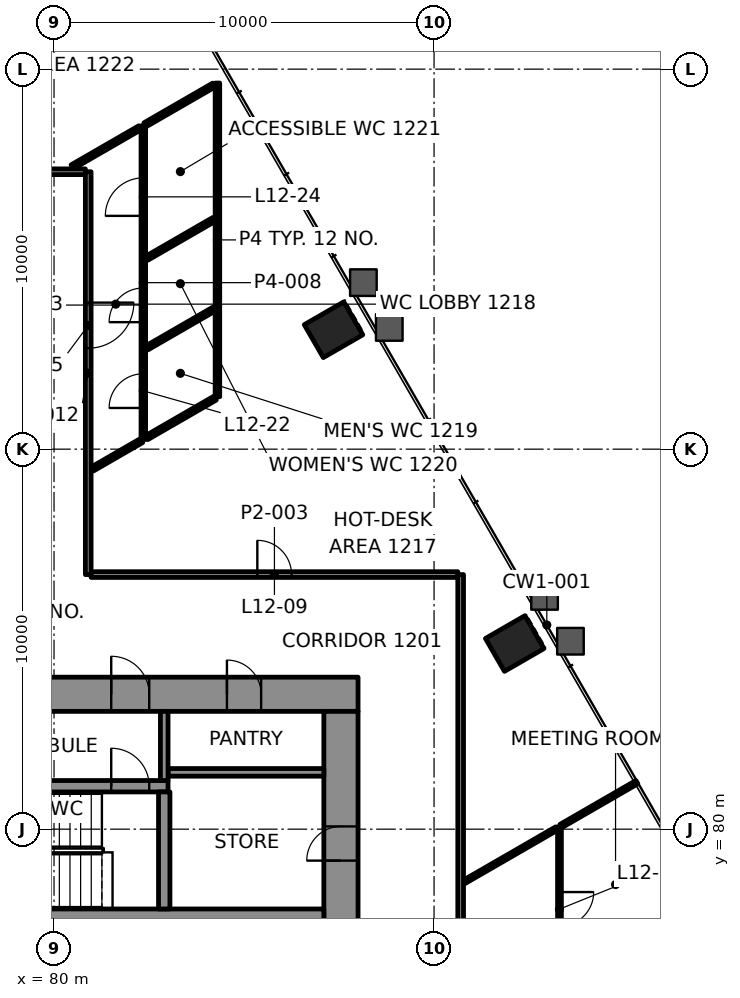
"""IFC4 building model, lengths in metres.
Left out: names, types, materials, properties, quantities, classifications, styles, units other than length and angle.
Written with IfcOpenShell. Run it as: python <this file> out.ifc"""

import sys

from ifc_helpers import new_model, si_unit, direction, frame, frame_2d, origin, origin_2d, place, context, subcontext, project, spatial, rectangle, extrude, element, fill, save


model = new_model("IFC4")
c1 = context("Model", 3, precision=1e-05, world=origin(), true_north=direction((0.0, 1.0)))
c2 = subcontext(c1, "Body", "Model", "MODEL_VIEW")
j1 = project(units=[si_unit("LENGTHUNIT", "METRE"), si_unit("PLANEANGLEUNIT", "RADIAN")], contexts=[c1])
p1 = place(None, origin())
s1 = spatial("IfcSite", under=j1, at=p1, CompositionType="ELEMENT")
p2 = place(p1, origin())
s2 = spatial("IfcBuilding", under=s1, at=p2, CompositionType="ELEMENT")
p3 = place(p2, frame((0.0, 0.0, 56.8)))
s3 = spatial("IfcBuildingStorey", under=s2, at=p3, CompositionType="ELEMENT", Elevation=56.8)
for number, where, z_axis, x_axis in (
    (1, (92.122, 84.885, -0.0), (0.0, 0.0, 1.0), (-0.5, 0.866, 0.0)),
    (2, (87.355, 93.143, -0.0), (0.0, 0.0, 1.0), (-0.5, 0.866, 0.0)),
):
    element("IfcColumn", number, at=place(p3, frame(where, z_axis=z_axis, x_axis=x_axis)), inside=s3, PredefinedType="COLUMN", context=c2, shape_type="SweptSolid", body=[
        extrude(rectangle(XDim=1.0, YDim=1.2, at=origin_2d()), origin(), (0.0, 0.0, 1.0), 4.2),
    ])
p4 = place(p3, frame((62.0, 83.55, 0.0), z_axis=(0.0, 0.0, 1.0), x_axis=(1.0, 0.0, 0.0)))
e3 = element("IfcWall", 3, at=p4, inside=s3, PredefinedType="SHEAR", context=c2, shape_type="SweptSolid", body=[
    extrude(rectangle(XDim=26.0, YDim=0.9, at=frame_2d((13.0, 0.0))), origin(), (0.0, 0.0, 1.0), 4.0),
])
p5 = place(p4, frame((5.695, 0.0, 0.0)))
e4 = element("IfcOpeningElement", 4, at=p5, cuts=e3, PredefinedType="OPENING", context=c2, shape_type="SweptSolid", body=[
    extrude(rectangle(XDim=1.0, YDim=2.1, at=frame_2d((0.5, 1.05))), frame((0.0, 0.46, 0.0), z_axis=(0.0, -1.0, 0.0), x_axis=(1.0, 0.0, 0.0)), (0.0, 0.0, 1.0), 0.92),
])
p6 = place(p4, frame((19.505, 0.0, 0.0)))
e5 = element("IfcOpeningElement", 5, at=p6, cuts=e3, PredefinedType="OPENING", context=c2, shape_type="SweptSolid", body=[
    extrude(rectangle(XDim=1.0, YDim=2.1, at=frame_2d((0.5, 1.05))), frame((0.0, 0.46, 0.0), z_axis=(0.0, -1.0, 0.0), x_axis=(1.0, 0.0, 0.0)), (0.0, 0.0, 1.0), 0.92),
])
p7 = place(p4, frame((3.45, 0.0, 0.0)))
e6 = element("IfcOpeningElement", 6, at=p7, cuts=e3, PredefinedType="OPENING", context=c2, shape_type="SweptSolid", body=[
    extrude(rectangle(XDim=0.9, YDim=2.1, at=frame_2d((0.45, 1.05))), frame((0.0, 0.46, 0.0), z_axis=(0.0, -1.0, 0.0), x_axis=(1.0, 0.0, 0.0)), (0.0, 0.0, 1.0), 0.92),
])
p8 = place(p4, frame((12.65, 0.0, 0.0)))
e7 = element("IfcOpeningElement", 7, at=p8, cuts=e3, PredefinedType="OPENING", context=c2, shape_type="SweptSolid", body=[
    extrude(rectangle(XDim=0.9, YDim=2.1, at=frame_2d((0.45, 1.05))), frame((0.0, 0.46, 0.0), z_axis=(0.0, -1.0, 0.0), x_axis=(1.0, 0.0, 0.0)), (0.0, 0.0, 1.0), 0.92),
])
p9 = place(p4, frame((22.55, 0.0, 0.0)))
e8 = element("IfcOpeningElement", 8, at=p9, cuts=e3, PredefinedType="OPENING", context=c2, shape_type="SweptSolid", body=[
    extrude(rectangle(XDim=0.9, YDim=2.1, at=frame_2d((0.45, 1.05))), frame((0.0, 0.46, 0.0), z_axis=(0.0, -1.0, 0.0), x_axis=(1.0, 0.0, 0.0)), (0.0, 0.0, 1.0), 0.92),
])
p10 = place(p3, frame((87.55, 66.9, 0.0), z_axis=(0.0, 0.0, 1.0), x_axis=(0.0, 1.0, 0.0)))
e9 = element("IfcWall", 9, at=p10, inside=s3, PredefinedType="SHEAR", context=c2, shape_type="SweptSolid", body=[
    extrude(rectangle(XDim=16.2, YDim=0.9, at=frame_2d((8.1, 0.0))), origin(), (0.0, 0.0, 1.0), 4.0),
])
p11 = place(p10, frame((5.5, 0.0, 0.0)))
e10 = element("IfcOpeningElement", 10, at=p11, cuts=e9, PredefinedType="OPENING", context=c2, shape_type="SweptSolid", body=[
    extrude(rectangle(XDim=1.8, YDim=2.1, at=frame_2d((0.9, 1.05))), frame((0.0, 0.46, 0.0), z_axis=(0.0, -1.0, 0.0), x_axis=(1.0, 0.0, 0.0)), (0.0, 0.0, 1.0), 0.92),
])
p12 = place(p10, frame((12.272, 0.0, 0.0)))
e11 = element("IfcOpeningElement", 11, at=p12, cuts=e9, PredefinedType="OPENING", context=c2, shape_type="SweptSolid", body=[
    extrude(rectangle(XDim=0.9, YDim=2.1, at=frame_2d((0.45, 1.05))), frame((0.0, 0.46, 0.0), z_axis=(0.0, -1.0, 0.0), x_axis=(1.0, 0.0, 0.0)), (0.0, 0.0, 1.0), 0.92),
])
p13 = place(p3, frame((64.35, 77.75, 0.0), z_axis=(0.0, 0.0, 1.0), x_axis=(1.0, 0.0, 0.0)))
e12 = element("IfcWall", 12, at=p13, inside=s3, PredefinedType="SHEAR", context=c2, shape_type="SweptSolid", body=[
    extrude(rectangle(XDim=22.75, YDim=0.3, at=frame_2d((11.375, 0.0))), origin(), (0.0, 0.0, 1.0), 4.0),
])
p14 = place(p13, frame((3.345, 0.0, 0.0)))
e13 = element("IfcOpeningElement", 13, at=p14, cuts=e12, PredefinedType="OPENING", context=c2, shape_type="SweptSolid", body=[
    extrude(rectangle(XDim=1.0, YDim=2.1, at=frame_2d((0.5, 1.05))), frame((0.0, 0.16, 0.0), z_axis=(0.0, -1.0, 0.0), x_axis=(1.0, 0.0, 0.0)), (0.0, 0.0, 1.0), 0.32),
])
p15 = place(p3, frame((76.14, 81.13, 0.0), z_axis=(0.0, 0.0, 1.0), x_axis=(1.0, 0.0, 0.0)))
e14 = element("IfcWall", 14, at=p15, inside=s3, PredefinedType="SHEAR", context=c2, shape_type="SweptSolid", body=[
    extrude(rectangle(XDim=6.86, YDim=0.3, at=frame_2d((3.43, 0.0))), origin(), (0.0, 0.0, 1.0), 4.0),
])
p16 = place(p15, frame((5.365, 0.0, 0.0)))
e15 = element("IfcOpeningElement", 15, at=p16, cuts=e14, PredefinedType="OPENING", context=c2, shape_type="SweptSolid", body=[
    extrude(rectangle(XDim=1.0, YDim=2.1, at=frame_2d((0.5, 1.05))), frame((0.0, 0.16, 0.0), z_axis=(0.0, -1.0, 0.0), x_axis=(1.0, 0.0, 0.0)), (0.0, 0.0, 1.0), 0.32),
])
p17 = place(p3, frame((82.9, 77.9, 0.0), z_axis=(0.0, 0.0, 1.0), x_axis=(0.0, 1.0, 0.0)))
e16 = element("IfcWall", 16, at=p17, inside=s3, PredefinedType="SHEAR", context=c2, shape_type="SweptSolid", body=[
    extrude(rectangle(XDim=3.08, YDim=0.3, at=frame_2d((1.54, 0.0))), origin(), (0.0, 0.0, 1.0), 4.0),
])
p18 = place(p3, frame((80.975, 86.7, 0.0), z_axis=(0.0, 0.0, 1.0), x_axis=(1.0, 0.0, 0.0)))
e17 = element("IfcWall", 17, at=p18, inside=s3, PredefinedType="PARTITIONING", context=c2, shape_type="SweptSolid", body=[
    extrude(rectangle(XDim=9.649, YDim=0.15, at=frame_2d((4.825, 0.0))), origin(), (0.0, 0.0, 1.0), 3.4),
])
p19 = place(p18, frame((4.375, 0.0, 0.0)))
e18 = element("IfcOpeningElement", 18, at=p19, cuts=e17, PredefinedType="OPENING", context=c2, shape_type="SweptSolid", body=[
    extrude(rectangle(XDim=0.9, YDim=2.1, at=frame_2d((0.45, 1.05))), frame((0.0, 0.085, 0.0), z_axis=(0.0, -1.0, 0.0), x_axis=(1.0, 0.0, 0.0)), (0.0, 0.0, 1.0), 0.17),
])
p20 = place(p3, frame((75.975, 97.3, 0.0), z_axis=(0.0, 0.0, 1.0), x_axis=(1.0, 0.0, 0.0)))
e19 = element("IfcWall", 19, at=p20, inside=s3, PredefinedType="PARTITIONING", context=c2, shape_type="SweptSolid", body=[
    extrude(rectangle(XDim=4.85, YDim=0.15, at=frame_2d((2.425, 0.0))), origin(), (0.0, 0.0, 1.0), 3.4),
])
p21 = place(p20, frame((1.792, 0.0, 0.0)))
e20 = element("IfcOpeningElement", 20, at=p21, cuts=e19, PredefinedType="OPENING", context=c2, shape_type="SweptSolid", body=[
    extrude(rectangle(XDim=0.9, YDim=2.1, at=frame_2d((0.45, 1.05))), frame((0.0, 0.085, 0.0), z_axis=(0.0, -1.0, 0.0), x_axis=(1.0, 0.0, 0.0)), (0.0, 0.0, 1.0), 0.17),
])
p22 = place(p3, frame((93.376, 75.976, 0.0), z_axis=(0.0, 0.0, 1.0), x_axis=(0.866006192811, 0.500033272906, 0.0)))
e21 = element("IfcWall", 21, at=p22, inside=s3, PredefinedType="PARTITIONING", context=c2, shape_type="SweptSolid", body=[
    extrude(rectangle(XDim=4.329, YDim=0.1, at=frame_2d((2.165, 0.0))), origin(), (0.0, 0.0, 1.0), 3.165),
])
p23 = place(p3, frame((90.801, 78.618, 0.0), z_axis=(0.0, 0.0, 1.0), x_axis=(0.866028733576, 0.499994232587, 0.0)))
e22 = element("IfcWall", 22, at=p23, inside=s3, PredefinedType="PARTITIONING", context=c2, shape_type="SweptSolid", body=[
    extrude(rectangle(XDim=2.799, YDim=0.1, at=frame_2d((1.4, 0.0))), origin(), (0.0, 0.0, 1.0), 3.4),
])
p24 = place(p3, frame((81.01, 89.479, 0.0), z_axis=(0.0, 0.0, 1.0), x_axis=(0.866055123991, 0.49994851956, 0.0)))
e23 = element("IfcWall", 23, at=p24, inside=s3, PredefinedType="PARTITIONING", context=c2, shape_type="SweptSolid", body=[
    extrude(rectangle(XDim=1.496, YDim=0.12, at=frame_2d((0.748, 0.0))), origin(), (0.0, 0.0, 1.0), 3.4),
])
for number, where, z_axis, x_axis in (
    (24, (82.445, 92.666, 0.0), (0.0, 0.0, 1.0), (0.866, 0.5, 0.0)),
    (25, (82.444, 95.026, 0.0), (0.0, 0.0, 1.0), (0.866, 0.5, 0.0)),
):
    element("IfcWall", number, at=place(p3, frame(where, z_axis=z_axis, x_axis=x_axis)), inside=s3, PredefinedType="PARTITIONING", context=c2, shape_type="SweptSolid", body=[
        extrude(rectangle(XDim=2.033, YDim=0.12, at=frame_2d((1.017, 0.0))), origin(), (0.0, 0.0, 1.0), 3.4),
    ])
p25 = place(p3, frame((80.479, 97.43, 0.0), z_axis=(0.0, 0.0, 1.0), x_axis=(0.866057052383, 0.499945179012, 0.0)))
e26 = element("IfcWall", 26, at=p25, inside=s3, PredefinedType="PARTITIONING", context=c2, shape_type="SweptSolid", body=[
    extrude(rectangle(XDim=2.056, YDim=0.12, at=frame_2d((1.028, 0.0))), origin(), (0.0, 0.0, 1.0), 3.4),
])
p26 = place(p3, frame((93.3, 80.061, 0.0), z_axis=(0.0, 0.0, 1.0), x_axis=(0.0, -1.0, 0.0)))
e27 = element("IfcWall", 27, at=p26, inside=s3, PredefinedType="PARTITIONING", context=c2, shape_type="SweptSolid", body=[
    extrude(rectangle(XDim=11.527, YDim=0.1, at=frame_2d((5.764, 0.0))), origin(), (0.0, 0.0, 1.0), 3.4),
])
p27 = place(p26, frame((1.716, 0.0, 0.0)))
e28 = element("IfcOpeningElement", 28, at=p27, cuts=e27, PredefinedType="OPENING", context=c2, shape_type="SweptSolid", body=[
    extrude(rectangle(XDim=0.9, YDim=2.1, at=frame_2d((0.45, 1.05))), frame((0.0, 0.06, 0.0), z_axis=(0.0, -1.0, 0.0), x_axis=(1.0, 0.0, 0.0)), (0.0, 0.0, 1.0), 0.12),
])
p28 = place(p26, frame((5.741, 0.0, 0.0)))
e29 = element("IfcOpeningElement", 29, at=p28, cuts=e27, PredefinedType="OPENING", context=c2, shape_type="SweptSolid", body=[
    extrude(rectangle(XDim=0.9, YDim=2.1, at=frame_2d((0.45, 1.05))), frame((0.0, 0.06, 0.0), z_axis=(0.0, -1.0, 0.0), x_axis=(1.0, 0.0, 0.0)), (0.0, 0.0, 1.0), 0.12),
])
p29 = place(p26, frame((9.342, 0.0, 0.0)))
e30 = element("IfcOpeningElement", 30, at=p29, cuts=e27, PredefinedType="OPENING", context=c2, shape_type="SweptSolid", body=[
    extrude(rectangle(XDim=0.9, YDim=2.1, at=frame_2d((0.45, 1.05))), frame((0.0, 0.06, 0.0), z_axis=(0.0, -1.0, 0.0), x_axis=(1.0, 0.0, 0.0)), (0.0, 0.0, 1.0), 0.12),
])
p30 = place(p3, frame((90.7, 86.699, 0.0), z_axis=(0.0, 0.0, 1.0), x_axis=(0.0, -1.0, 0.0)))
e31 = element("IfcWall", 31, at=p30, inside=s3, PredefinedType="PARTITIONING", context=c2, shape_type="SweptSolid", body=[
    extrude(rectangle(XDim=19.725, YDim=0.15, at=frame_2d((9.862, 0.0))), origin(), (0.0, 0.0, 1.0), 3.4),
])
p31 = place(p30, frame((11.768, 0.0, 0.0)))
e32 = element("IfcOpeningElement", 32, at=p31, cuts=e31, PredefinedType="OPENING", context=c2, shape_type="SweptSolid", body=[
    extrude(rectangle(XDim=1.0, YDim=2.1, at=frame_2d((0.5, 1.05))), frame((0.0, 0.085, 0.0), z_axis=(0.0, -1.0, 0.0), x_axis=(1.0, 0.0, 0.0)), (0.0, 0.0, 1.0), 0.17),
])
p32 = place(p30, frame((17.459, 0.0, 0.0)))
e33 = element("IfcOpeningElement", 33, at=p32, cuts=e31, PredefinedType="OPENING", context=c2, shape_type="SweptSolid", body=[
    extrude(rectangle(XDim=1.0, YDim=2.1, at=frame_2d((0.5, 1.05))), frame((0.0, 0.085, 0.0), z_axis=(0.0, -1.0, 0.0), x_axis=(1.0, 0.0, 0.0)), (0.0, 0.0, 1.0), 0.17),
])
p33 = place(p3, frame((84.3, 91.379, 0.0), z_axis=(0.0, 0.0, 1.0), x_axis=(0.0, 1.0, 0.0)))
e34 = element("IfcWall", 34, at=p33, inside=s3, PredefinedType="PARTITIONING", context=c2, shape_type="SweptSolid", body=[
    extrude(rectangle(XDim=8.255, YDim=0.12, at=frame_2d((4.127, 0.0))), origin(), (0.0, 0.0, 1.0), 3.165),
])
p34 = place(p3, frame((82.35, 90.253, 0.0), z_axis=(0.0, 0.0, 1.0), x_axis=(0.0, 1.0, 0.0)))
e35 = element("IfcWall", 35, at=p34, inside=s3, PredefinedType="PARTITIONING", context=c2, shape_type="SweptSolid", body=[
    extrude(rectangle(XDim=8.257, YDim=0.12, at=frame_2d((4.128, 0.0))), origin(), (0.0, 0.0, 1.0), 3.4),
])
p35 = place(p34, frame((0.831, 0.0, 0.0)))
e36 = element("IfcOpeningElement", 36, at=p35, cuts=e35, PredefinedType="OPENING", context=c2, shape_type="SweptSolid", body=[
    extrude(rectangle(XDim=0.9, YDim=2.1, at=frame_2d((0.45, 1.05))), frame((0.0, 0.07, 0.0), z_axis=(0.0, -1.0, 0.0), x_axis=(1.0, 0.0, 0.0)), (0.0, 0.0, 1.0), 0.14),
])
p36 = place(p34, frame((3.089, 0.0, 0.0)))
e37 = element("IfcOpeningElement", 37, at=p36, cuts=e35, PredefinedType="OPENING", context=c2, shape_type="SweptSolid", body=[
    extrude(rectangle(XDim=0.9, YDim=2.1, at=frame_2d((0.45, 1.05))), frame((0.0, 0.07, 0.0), z_axis=(0.0, -1.0, 0.0), x_axis=(1.0, 0.0, 0.0)), (0.0, 0.0, 1.0), 0.14),
])
p37 = place(p34, frame((5.886, 0.0, 0.0)))
e38 = element("IfcOpeningElement", 38, at=p37, cuts=e35, PredefinedType="OPENING", context=c2, shape_type="SweptSolid", body=[
    extrude(rectangle(XDim=1.0, YDim=2.1, at=frame_2d((0.5, 1.05))), frame((0.0, 0.07, 0.0), z_axis=(0.0, -1.0, 0.0), x_axis=(1.0, 0.0, 0.0)), (0.0, 0.0, 1.0), 0.14),
])
p38 = place(p3, frame((80.9, 97.3, 0.0), z_axis=(0.0, 0.0, 1.0), x_axis=(0.0, -1.0, 0.0)))
e39 = element("IfcWall", 39, at=p38, inside=s3, PredefinedType="PARTITIONING", context=c2, shape_type="SweptSolid", body=[
    extrude(rectangle(XDim=10.6, YDim=0.15, at=frame_2d((5.3, 0.0))), origin(), (0.0, 0.0, 1.0), 3.4),
])
p39 = place(p38, frame((3.444, 0.0, 0.0)))
e40 = element("IfcOpeningElement", 40, at=p39, cuts=e39, PredefinedType="OPENING", context=c2, shape_type="SweptSolid", body=[
    extrude(rectangle(XDim=1.2, YDim=2.1, at=frame_2d((0.6, 1.05))), frame((0.0, 0.085, 0.0), z_axis=(0.0, -1.0, 0.0), x_axis=(1.0, 0.0, 0.0)), (0.0, 0.0, 1.0), 0.17),
])
p40 = place(p3, frame((93.337, 80.083, 0.0), z_axis=(0.0, 0.0, 1.0), x_axis=(0.866028885721, 0.49999396906, 0.0)))
e41 = element("IfcWall", 41, at=p40, inside=s3, PredefinedType="PARTITIONING", context=c2, shape_type="SweptSolid", body=[
    extrude(rectangle(XDim=2.309, YDim=0.1, at=frame_2d((1.155, 0.0))), origin(), (0.0, 0.0, 1.0), 3.165),
])
p41 = place(p3, frame((82.44, 90.304, 0.0), z_axis=(0.0, 0.0, 1.0), x_axis=(0.866044773228, 0.499966449638, 0.0)))
e42 = element("IfcWall", 42, at=p41, inside=s3, PredefinedType="PARTITIONING", context=c2, shape_type="SweptSolid", body=[
    extrude(rectangle(XDim=2.079, YDim=0.12, at=frame_2d((1.04, 0.0))), origin(), (0.0, 0.0, 1.0), 3.4),
])
p42 = place(p3, frame((82.395, 98.536, 0.0), z_axis=(0.0, 0.0, 1.0), x_axis=(0.866041603473, 0.499971940267, 0.0)))
e43 = element("IfcWall", 43, at=p42, inside=s3, PredefinedType="PARTITIONING", context=c2, shape_type="SweptSolid", body=[
    extrude(rectangle(XDim=2.089, YDim=0.12, at=frame_2d((1.045, 0.0))), origin(), (0.0, 0.0, 1.0), 3.165),
])
p43 = place(p3, frame((83.0, 81.495, 0.0), z_axis=(0.0, 0.0, 1.0), x_axis=(1.0, 0.0, 0.0)))
e44 = element("IfcWall", 44, at=p43, inside=s3, PredefinedType="PARTITIONING", context=c2, shape_type="SweptSolid", body=[
    extrude(rectangle(XDim=4.1, YDim=0.2, at=frame_2d((2.05, 0.0))), origin(), (0.0, 0.0, 1.0), 4.0),
])
p44 = place(p3, frame((82.9, 81.28, 0.0), z_axis=(0.0, 0.0, 1.0), x_axis=(0.0, 1.0, 0.0)))
e45 = element("IfcWall", 45, at=p44, inside=s3, PredefinedType="PARTITIONING", context=c2, shape_type="SweptSolid", body=[
    extrude(rectangle(XDim=1.82, YDim=0.2, at=frame_2d((0.91, 0.0))), origin(), (0.0, 0.0, 1.0), 4.0),
])
p45 = place(p19, origin())
e46 = element("IfcDoor", 46, at=p45, inside=s3, OperationType="SINGLE_SWING_RIGHT", PredefinedType="DOOR", context=c2, shape_type="SweptSolid", body=[
    extrude(rectangle(XDim=0.9, YDim=2.1, at=frame_2d((0.45, 1.05))), frame((0.0, 0.025, 0.0), z_axis=(0.0, -1.0, 0.0), x_axis=(1.0, 0.0, 0.0)), (0.0, 0.0, 1.0), 0.05),
])
fill(e18, e46)
p46 = place(p27, origin())
e47 = element("IfcDoor", 47, at=p46, inside=s3, OperationType="SINGLE_SWING_RIGHT", PredefinedType="DOOR", context=c2, shape_type="SweptSolid", body=[
    extrude(rectangle(XDim=0.9, YDim=2.1, at=frame_2d((0.45, 1.05))), frame((0.0, 0.025, 0.0), z_axis=(0.0, -1.0, 0.0), x_axis=(1.0, 0.0, 0.0)), (0.0, 0.0, 1.0), 0.05),
])
fill(e28, e47)
p47 = place(p35, origin())
e48 = element("IfcDoor", 48, at=p47, inside=s3, OperationType="SINGLE_SWING_RIGHT", PredefinedType="DOOR", context=c2, shape_type="SweptSolid", body=[
    extrude(rectangle(XDim=0.9, YDim=2.1, at=frame_2d((0.45, 1.05))), frame((0.0, 0.025, 0.0), z_axis=(0.0, -1.0, 0.0), x_axis=(1.0, 0.0, 0.0)), (0.0, 0.0, 1.0), 0.05),
])
fill(e36, e48)
p48 = place(p36, origin())
e49 = element("IfcDoor", 49, at=p48, inside=s3, OperationType="SINGLE_SWING_LEFT", PredefinedType="DOOR", context=c2, shape_type="SweptSolid", body=[
    extrude(rectangle(XDim=0.9, YDim=2.1, at=frame_2d((0.45, 1.05))), frame((0.0, 0.025, 0.0), z_axis=(0.0, -1.0, 0.0), x_axis=(1.0, 0.0, 0.0)), (0.0, 0.0, 1.0), 0.05),
])
fill(e37, e49)
p49 = place(p37, origin())
e50 = element("IfcDoor", 50, at=p49, inside=s3, OperationType="SINGLE_SWING_RIGHT", PredefinedType="DOOR", context=c2, shape_type="SweptSolid", body=[
    extrude(rectangle(XDim=1.0, YDim=2.1, at=frame_2d((0.5, 1.05))), frame((0.0, 0.025, 0.0), z_axis=(0.0, -1.0, 0.0), x_axis=(1.0, 0.0, 0.0)), (0.0, 0.0, 1.0), 0.05),
])
fill(e38, e50)
p50 = place(p39, origin())
e51 = element("IfcDoor", 51, at=p50, inside=s3, OperationType="DOUBLE_DOOR_SINGLE_SWING", PredefinedType="DOOR", context=c2, shape_type="SweptSolid", body=[
    extrude(rectangle(XDim=1.2, YDim=2.1, at=frame_2d((0.6, 1.05))), frame((0.0, 0.025, 0.0), z_axis=(0.0, -1.0, 0.0), x_axis=(1.0, 0.0, 0.0)), (0.0, 0.0, 1.0), 0.05),
])
fill(e40, e51)
p51 = place(p16, origin())
e52 = element("IfcDoor", 52, at=p51, inside=s3, OperationType="SINGLE_SWING_RIGHT", PredefinedType="DOOR", context=c2, shape_type="SweptSolid", body=[
    extrude(rectangle(XDim=1.0, YDim=2.1, at=frame_2d((0.5, 1.05))), frame((0.0, 0.025, 0.0), z_axis=(0.0, -1.0, 0.0), x_axis=(1.0, 0.0, 0.0)), (0.0, 0.0, 1.0), 0.05),
])
fill(e15, e52)
p52 = place(p6, origin())
e53 = element("IfcDoor", 53, at=p52, inside=s3, OperationType="SINGLE_SWING_LEFT", PredefinedType="DOOR", context=c2, shape_type="SweptSolid", body=[
    extrude(rectangle(XDim=1.0, YDim=2.1, at=frame_2d((0.5, 1.05))), frame((0.0, 0.17, 0.0), z_axis=(0.0, -1.0, 0.0), x_axis=(1.0, 0.0, 0.0)), (0.0, 0.0, 1.0), 0.34),
])
fill(e5, e53)
p53 = place(p12, origin())
e54 = element("IfcDoor", 54, at=p53, inside=s3, OperationType="SINGLE_SWING_RIGHT", PredefinedType="DOOR", context=c2, shape_type="SweptSolid", body=[
    extrude(rectangle(XDim=0.9, YDim=2.1, at=frame_2d((0.45, 1.05))), frame((0.0, 0.17, 0.0), z_axis=(0.0, -1.0, 0.0), x_axis=(1.0, 0.0, 0.0)), (0.0, 0.0, 1.0), 0.34),
])
fill(e11, e54)
p54 = place(p9, origin())
e55 = element("IfcDoor", 55, at=p54, inside=s3, OperationType="SINGLE_SWING_LEFT", PredefinedType="DOOR", context=c2, shape_type="SweptSolid", body=[
    extrude(rectangle(XDim=0.9, YDim=2.1, at=frame_2d((0.45, 1.05))), frame((0.0, 0.17, 0.0), z_axis=(0.0, -1.0, 0.0), x_axis=(1.0, 0.0, 0.0)), (0.0, 0.0, 1.0), 0.34),
])
fill(e8, e55)
save(model, sys.argv[1])
